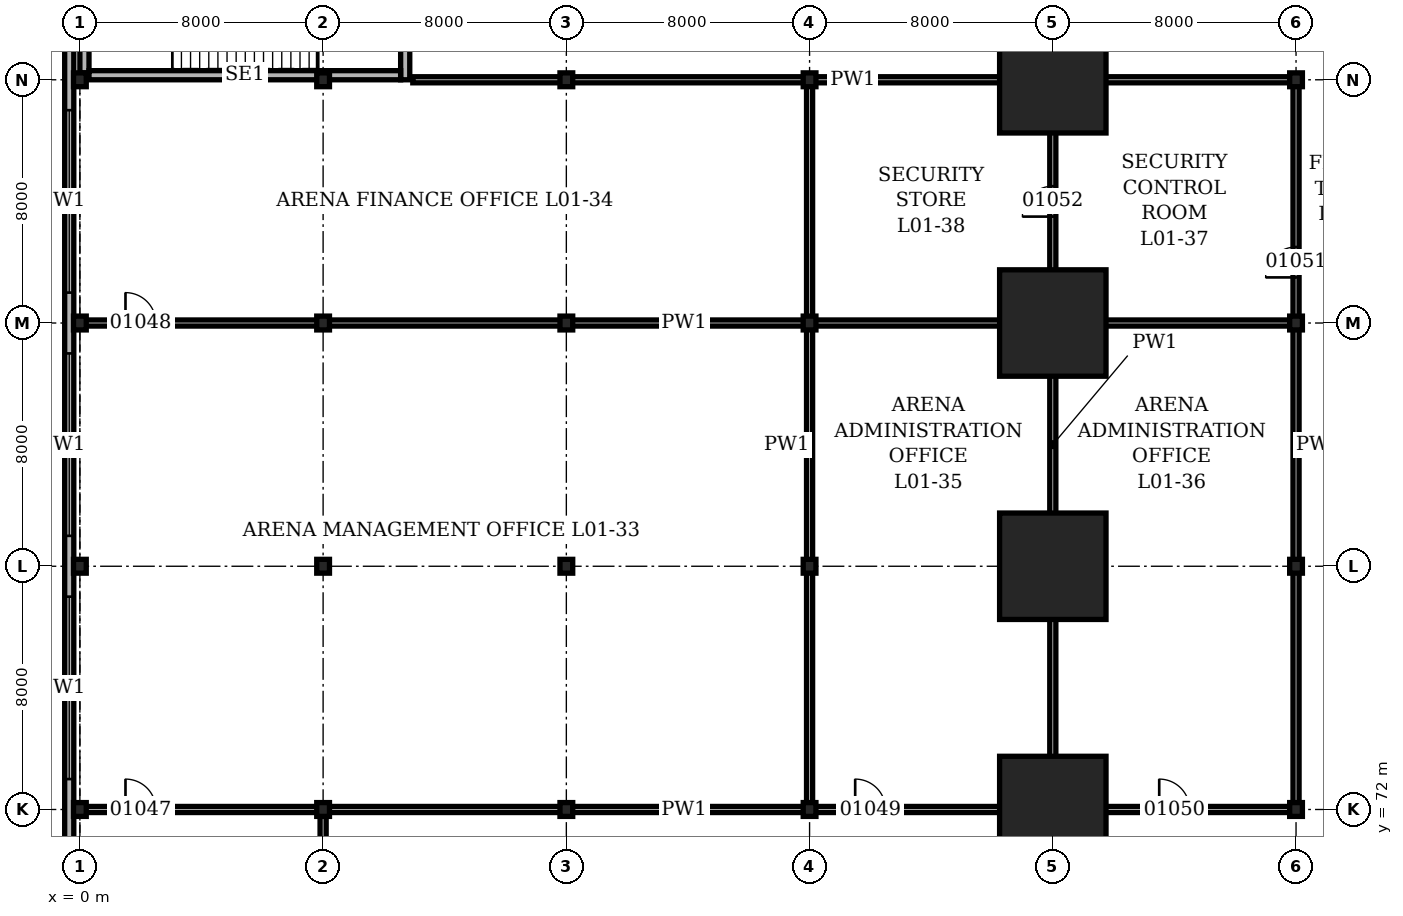
"""IFC4 building model, lengths in metres.
Left out: names, types, materials, properties, quantities, classifications, styles, units other than length and angle.
Written with IfcOpenShell. Run it as: python <this file> out.ifc"""

import sys

from ifc_helpers import new_model, si_unit, direction, frame, frame_2d, origin, origin_2d, place, context, subcontext, project, spatial, rectangle, hollow_rectangle, i_section, extrude, element, fill, save


model = new_model("IFC4")
c1 = context("Model", 3, precision=1e-05, world=origin(), true_north=direction((0.0, 1.0)))
c2 = subcontext(c1, "Body", "Model", "MODEL_VIEW")
j1 = project(units=[si_unit("LENGTHUNIT", "METRE"), si_unit("PLANEANGLEUNIT", "RADIAN")], contexts=[c1])
p1 = place(None, origin())
s1 = spatial("IfcSite", under=j1, at=p1, CompositionType="ELEMENT")
p2 = place(p1, origin())
s2 = spatial("IfcBuilding", under=s1, at=p2, CompositionType="ELEMENT")
p3 = place(p2, frame((0.0, 0.0, 4.9)))
s3 = spatial("IfcBuildingStorey", under=s2, at=p3, CompositionType="ELEMENT", Elevation=4.9)
for number, where, z_axis, x_axis in (
    (1, (0.0, 72.0, 0.0), (0.0, 0.0, 1.0), (1.0, 0.0, 0.0)),
    (2, (0.0, 80.0, 0.0), (0.0, 0.0, 1.0), (1.0, 0.0, 0.0)),
    (3, (0.0, 88.0, 0.0), (0.0, 0.0, 1.0), (1.0, 0.0, 0.0)),
    (4, (0.0, 96.0, 0.0), (0.0, 0.0, 1.0), (1.0, 0.0, 0.0)),
    (5, (8.0, 72.0, 0.0), (0.0, 0.0, 1.0), (1.0, 0.0, 0.0)),
    (6, (8.0, 80.0, 0.0), (0.0, 0.0, 1.0), (1.0, 0.0, 0.0)),
    (7, (8.0, 88.0, 0.0), (0.0, 0.0, 1.0), (1.0, 0.0, 0.0)),
    (8, (8.0, 96.0, 0.0), (0.0, 0.0, 1.0), (1.0, 0.0, 0.0)),
    (9, (16.0, 72.0, 0.0), (0.0, 0.0, 1.0), (1.0, 0.0, 0.0)),
    (10, (16.0, 80.0, 0.0), (0.0, 0.0, 1.0), (1.0, 0.0, 0.0)),
    (11, (16.0, 88.0, 0.0), (0.0, 0.0, 1.0), (1.0, 0.0, 0.0)),
    (12, (16.0, 96.0, 0.0), (0.0, 0.0, 1.0), (1.0, 0.0, 0.0)),
    (13, (24.0, 72.0, 0.0), (0.0, 0.0, 1.0), (1.0, 0.0, 0.0)),
    (14, (24.0, 80.0, 0.0), (0.0, 0.0, 1.0), (1.0, 0.0, 0.0)),
    (15, (24.0, 88.0, 0.0), (0.0, 0.0, 1.0), (1.0, 0.0, 0.0)),
    (16, (24.0, 96.0, 0.0), (0.0, 0.0, 1.0), (1.0, 0.0, 0.0)),
):
    element("IfcColumn", number, at=place(p3, frame(where, z_axis=z_axis, x_axis=x_axis)), inside=s3, PredefinedType="COLUMN", context=c2, shape_type="SweptSolid", body=[
        extrude(i_section(OverallWidth=0.419, OverallDepth=0.455, WebThickness=0.042, FlangeThickness=0.068, at=origin_2d()), origin(), (0.0, 0.0, 1.0), 5.0),
    ])
for number, where, z_axis, x_axis in (
    (17, (32.0, 72.0, 0.0), (0.0, 0.0, 1.0), (1.0, 0.0, 0.0)),
    (18, (32.0, 80.0, 0.0), (0.0, 0.0, 1.0), (1.0, 0.0, 0.0)),
    (19, (32.0, 88.0, 0.0), (0.0, 0.0, 1.0), (1.0, 0.0, 0.0)),
    (20, (32.0, 96.0, 0.0), (0.0, 0.0, 1.0), (1.0, 0.0, 0.0)),
):
    element("IfcColumn", number, at=place(p3, frame(where, z_axis=z_axis, x_axis=x_axis)), inside=s3, PredefinedType="COLUMN", context=c2, shape_type="SweptSolid", body=[
        extrude(hollow_rectangle(XDim=3.5, YDim=3.5, WallThickness=0.5, at=origin_2d()), origin(), (0.0, 0.0, 1.0), 5.0),
    ])
for number, where, z_axis, x_axis in (
    (21, (40.0, 72.0, 0.0), (0.0, 0.0, 1.0), (1.0, 0.0, 0.0)),
    (22, (40.0, 80.0, 0.0), (0.0, 0.0, 1.0), (1.0, 0.0, 0.0)),
    (23, (40.0, 88.0, 0.0), (0.0, 0.0, 1.0), (1.0, 0.0, 0.0)),
    (24, (40.0, 96.0, 0.0), (0.0, 0.0, 1.0), (1.0, 0.0, 0.0)),
):
    element("IfcColumn", number, at=place(p3, frame(where, z_axis=z_axis, x_axis=x_axis)), inside=s3, PredefinedType="COLUMN", context=c2, shape_type="SweptSolid", body=[
        extrude(i_section(OverallWidth=0.419, OverallDepth=0.455, WebThickness=0.042, FlangeThickness=0.068, at=origin_2d()), origin(), (0.0, 0.0, 1.0), 5.0),
    ])
p4 = place(p3, frame((-0.35, 112.35, 0.0), z_axis=(0.0, 0.0, 1.0), x_axis=(0.0, -1.0, 0.0)))
e25 = element("IfcWall", 25, at=p4, inside=s3, PredefinedType="SOLIDWALL", context=c2, shape_type="SweptSolid", body=[
    extrude(rectangle(XDim=112.7, YDim=0.3, at=frame_2d((56.35, 0.0))), origin(), (0.0, 0.0, 1.0), 5.0),
])
p5 = place(p4, frame((1.35, 0.0, 1.0)))
e26 = element("IfcOpeningElement", 26, at=p5, cuts=e25, PredefinedType="OPENING", context=c2, shape_type="SweptSolid", body=[
    extrude(rectangle(XDim=6.0, YDim=1.5, at=frame_2d((3.0, 0.75))), frame((0.0, 0.16, 0.0), z_axis=(0.0, -1.0, 0.0), x_axis=(1.0, 0.0, 0.0)), (0.0, 0.0, 1.0), 0.32),
])
p6 = place(p4, frame((9.35, 0.0, 1.0)))
e27 = element("IfcOpeningElement", 27, at=p6, cuts=e25, PredefinedType="OPENING", context=c2, shape_type="SweptSolid", body=[
    extrude(rectangle(XDim=6.0, YDim=1.5, at=frame_2d((3.0, 0.75))), frame((0.0, 0.16, 0.0), z_axis=(0.0, -1.0, 0.0), x_axis=(1.0, 0.0, 0.0)), (0.0, 0.0, 1.0), 0.32),
])
p7 = place(p4, frame((17.35, 0.0, 1.0)))
e28 = element("IfcOpeningElement", 28, at=p7, cuts=e25, PredefinedType="OPENING", context=c2, shape_type="SweptSolid", body=[
    extrude(rectangle(XDim=6.0, YDim=1.5, at=frame_2d((3.0, 0.75))), frame((0.0, 0.16, 0.0), z_axis=(0.0, -1.0, 0.0), x_axis=(1.0, 0.0, 0.0)), (0.0, 0.0, 1.0), 0.32),
])
p8 = place(p4, frame((25.35, 0.0, 1.0)))
e29 = element("IfcOpeningElement", 29, at=p8, cuts=e25, PredefinedType="OPENING", context=c2, shape_type="SweptSolid", body=[
    extrude(rectangle(XDim=6.0, YDim=1.5, at=frame_2d((3.0, 0.75))), frame((0.0, 0.16, 0.0), z_axis=(0.0, -1.0, 0.0), x_axis=(1.0, 0.0, 0.0)), (0.0, 0.0, 1.0), 0.32),
])
p9 = place(p4, frame((33.35, 0.0, 1.0)))
e30 = element("IfcOpeningElement", 30, at=p9, cuts=e25, PredefinedType="OPENING", context=c2, shape_type="SweptSolid", body=[
    extrude(rectangle(XDim=6.0, YDim=1.5, at=frame_2d((3.0, 0.75))), frame((0.0, 0.16, 0.0), z_axis=(0.0, -1.0, 0.0), x_axis=(1.0, 0.0, 0.0)), (0.0, 0.0, 1.0), 0.32),
])
p10 = place(p4, frame((41.35, 0.0, 1.0)))
e31 = element("IfcOpeningElement", 31, at=p10, cuts=e25, PredefinedType="OPENING", context=c2, shape_type="SweptSolid", body=[
    extrude(rectangle(XDim=6.0, YDim=1.5, at=frame_2d((3.0, 0.75))), frame((0.0, 0.16, 0.0), z_axis=(0.0, -1.0, 0.0), x_axis=(1.0, 0.0, 0.0)), (0.0, 0.0, 1.0), 0.32),
])
p11 = place(p4, frame((49.35, 0.0, 1.0)))
e32 = element("IfcOpeningElement", 32, at=p11, cuts=e25, PredefinedType="OPENING", context=c2, shape_type="SweptSolid", body=[
    extrude(rectangle(XDim=6.0, YDim=1.5, at=frame_2d((3.0, 0.75))), frame((0.0, 0.16, 0.0), z_axis=(0.0, -1.0, 0.0), x_axis=(1.0, 0.0, 0.0)), (0.0, 0.0, 1.0), 0.32),
])
p12 = place(p4, frame((57.35, 0.0, 1.0)))
e33 = element("IfcOpeningElement", 33, at=p12, cuts=e25, PredefinedType="OPENING", context=c2, shape_type="SweptSolid", body=[
    extrude(rectangle(XDim=6.0, YDim=1.5, at=frame_2d((3.0, 0.75))), frame((0.0, 0.16, 0.0), z_axis=(0.0, -1.0, 0.0), x_axis=(1.0, 0.0, 0.0)), (0.0, 0.0, 1.0), 0.32),
])
p13 = place(p4, frame((65.35, 0.0, 1.0)))
e34 = element("IfcOpeningElement", 34, at=p13, cuts=e25, PredefinedType="OPENING", context=c2, shape_type="SweptSolid", body=[
    extrude(rectangle(XDim=6.0, YDim=1.5, at=frame_2d((3.0, 0.75))), frame((0.0, 0.16, 0.0), z_axis=(0.0, -1.0, 0.0), x_axis=(1.0, 0.0, 0.0)), (0.0, 0.0, 1.0), 0.32),
])
p14 = place(p4, frame((73.35, 0.0, 1.0)))
e35 = element("IfcOpeningElement", 35, at=p14, cuts=e25, PredefinedType="OPENING", context=c2, shape_type="SweptSolid", body=[
    extrude(rectangle(XDim=6.0, YDim=1.5, at=frame_2d((3.0, 0.75))), frame((0.0, 0.16, 0.0), z_axis=(0.0, -1.0, 0.0), x_axis=(1.0, 0.0, 0.0)), (0.0, 0.0, 1.0), 0.32),
])
p15 = place(p4, frame((81.35, 0.0, 1.0)))
e36 = element("IfcOpeningElement", 36, at=p15, cuts=e25, PredefinedType="OPENING", context=c2, shape_type="SweptSolid", body=[
    extrude(rectangle(XDim=6.0, YDim=1.5, at=frame_2d((3.0, 0.75))), frame((0.0, 0.16, 0.0), z_axis=(0.0, -1.0, 0.0), x_axis=(1.0, 0.0, 0.0)), (0.0, 0.0, 1.0), 0.32),
])
p16 = place(p4, frame((89.35, 0.0, 1.0)))
e37 = element("IfcOpeningElement", 37, at=p16, cuts=e25, PredefinedType="OPENING", context=c2, shape_type="SweptSolid", body=[
    extrude(rectangle(XDim=6.0, YDim=1.5, at=frame_2d((3.0, 0.75))), frame((0.0, 0.16, 0.0), z_axis=(0.0, -1.0, 0.0), x_axis=(1.0, 0.0, 0.0)), (0.0, 0.0, 1.0), 0.32),
])
p17 = place(p4, frame((97.35, 0.0, 1.0)))
e38 = element("IfcOpeningElement", 38, at=p17, cuts=e25, PredefinedType="OPENING", context=c2, shape_type="SweptSolid", body=[
    extrude(rectangle(XDim=6.0, YDim=1.5, at=frame_2d((3.0, 0.75))), frame((0.0, 0.16, 0.0), z_axis=(0.0, -1.0, 0.0), x_axis=(1.0, 0.0, 0.0)), (0.0, 0.0, 1.0), 0.32),
])
p18 = place(p4, frame((105.35, 0.0, 1.0)))
e39 = element("IfcOpeningElement", 39, at=p18, cuts=e25, PredefinedType="OPENING", context=c2, shape_type="SweptSolid", body=[
    extrude(rectangle(XDim=6.0, YDim=1.5, at=frame_2d((3.0, 0.75))), frame((0.0, 0.16, 0.0), z_axis=(0.0, -1.0, 0.0), x_axis=(1.0, 0.0, 0.0)), (0.0, 0.0, 1.0), 0.32),
])
p19 = place(p3, frame((0.15, 96.227, 0.0), z_axis=(0.0, 0.0, 1.0), x_axis=(0.0, 1.0, 0.0)))
e40 = element("IfcWall", 40, at=p19, inside=s3, PredefinedType="SOLIDWALL", context=c2, shape_type="SweptSolid", body=[
    extrude(rectangle(XDim=7.545, YDim=0.3, at=frame_2d((3.773, 0.0))), origin(), (0.0, 0.0, 1.0), 4.8),
])
p20 = place(p3, frame((10.7, 96.0, 0.0), z_axis=(0.0, 0.0, 1.0), x_axis=(0.0, 1.0, 0.0)))
e41 = element("IfcWall", 41, at=p20, inside=s3, PredefinedType="SOLIDWALL", context=c2, shape_type="SweptSolid", body=[
    extrude(rectangle(XDim=8.0, YDim=0.3, at=frame_2d((4.0, 0.0))), origin(), (0.0, 0.0, 1.0), 4.8),
])
p21 = place(p20, frame((1.1, 0.0, 0.0)))
e42 = element("IfcOpeningElement", 42, at=p21, cuts=e41, PredefinedType="OPENING", context=c2, shape_type="SweptSolid", body=[
    extrude(rectangle(XDim=1.8, YDim=2.1, at=frame_2d((0.9, 1.05))), frame((0.0, 0.16, 0.0), z_axis=(0.0, -1.0, 0.0), x_axis=(1.0, 0.0, 0.0)), (0.0, 0.0, 1.0), 0.32),
])
p22 = place(p3, frame((0.3, 96.15, 0.0), z_axis=(0.0, 0.0, 1.0), x_axis=(1.0, 0.0, 0.0)))
e43 = element("IfcWall", 43, at=p22, inside=s3, PredefinedType="SOLIDWALL", context=c2, shape_type="SweptSolid", body=[
    extrude(rectangle(XDim=10.25, YDim=0.3, at=frame_2d((5.125, 0.0))), origin(), (0.0, 0.0, 1.0), 4.8),
])
p23 = place(p3, frame((-0.15, 72.0, 0.0), z_axis=(0.0, 0.0, 1.0), x_axis=(1.0, 0.0, 0.0)))
e44 = element("IfcWall", 44, at=p23, inside=s3, PredefinedType="PARTITIONING", context=c2, shape_type="SweptSolid", body=[
    extrude(rectangle(XDim=40.05, YDim=0.2, at=frame_2d((20.025, 0.0))), origin(), (0.0, 0.0, 1.0), 4.028),
])
p24 = place(p23, frame((1.65, 0.0, 0.0)))
e45 = element("IfcOpeningElement", 45, at=p24, cuts=e44, PredefinedType="OPENING", context=c2, shape_type="SweptSolid", body=[
    extrude(rectangle(XDim=1.0, YDim=2.1, at=frame_2d((0.5, 1.05))), frame((0.0, 0.11, 0.0), z_axis=(0.0, -1.0, 0.0), x_axis=(1.0, 0.0, 0.0)), (0.0, 0.0, 1.0), 0.22),
])
p25 = place(p23, frame((25.65, 0.0, 0.0)))
e46 = element("IfcOpeningElement", 46, at=p25, cuts=e44, PredefinedType="OPENING", context=c2, shape_type="SweptSolid", body=[
    extrude(rectangle(XDim=1.0, YDim=2.1, at=frame_2d((0.5, 1.05))), frame((0.0, 0.11, 0.0), z_axis=(0.0, -1.0, 0.0), x_axis=(1.0, 0.0, 0.0)), (0.0, 0.0, 1.0), 0.22),
])
p26 = place(p23, frame((35.65, 0.0, 0.0)))
e47 = element("IfcOpeningElement", 47, at=p26, cuts=e44, PredefinedType="OPENING", context=c2, shape_type="SweptSolid", body=[
    extrude(rectangle(XDim=1.0, YDim=2.1, at=frame_2d((0.5, 1.05))), frame((0.0, 0.11, 0.0), z_axis=(0.0, -1.0, 0.0), x_axis=(1.0, 0.0, 0.0)), (0.0, 0.0, 1.0), 0.22),
])
p27 = place(p3, frame((-0.15, 88.0, 0.0), z_axis=(0.0, 0.0, 1.0), x_axis=(1.0, 0.0, 0.0)))
e48 = element("IfcWall", 48, at=p27, inside=s3, PredefinedType="PARTITIONING", context=c2, shape_type="SweptSolid", body=[
    extrude(rectangle(XDim=40.05, YDim=0.2, at=frame_2d((20.025, 0.0))), origin(), (0.0, 0.0, 1.0), 4.028),
])
p28 = place(p27, frame((1.65, 0.0, 0.0)))
e49 = element("IfcOpeningElement", 49, at=p28, cuts=e48, PredefinedType="OPENING", context=c2, shape_type="SweptSolid", body=[
    extrude(rectangle(XDim=1.0, YDim=2.1, at=frame_2d((0.5, 1.05))), frame((0.0, 0.11, 0.0), z_axis=(0.0, -1.0, 0.0), x_axis=(1.0, 0.0, 0.0)), (0.0, 0.0, 1.0), 0.22),
])
p29 = place(p3, frame((10.95, 96.0, 0.0), z_axis=(0.0, 0.0, 1.0), x_axis=(1.0, 0.0, 0.0)))
e50 = element("IfcWall", 50, at=p29, inside=s3, PredefinedType="PARTITIONING", context=c2, shape_type="SweptSolid", body=[
    extrude(rectangle(XDim=28.95, YDim=0.2, at=frame_2d((14.475, 0.0))), origin(), (0.0, 0.0, 1.0), 4.028),
])
p30 = place(p3, frame((8.0, 64.1, 0.0), z_axis=(0.0, 0.0, 1.0), x_axis=(0.0, 1.0, 0.0)))
e51 = element("IfcWall", 51, at=p30, inside=s3, PredefinedType="PARTITIONING", context=c2, shape_type="SweptSolid", body=[
    extrude(rectangle(XDim=7.8, YDim=0.2, at=frame_2d((3.9, 0.0))), origin(), (0.0, 0.0, 1.0), 4.028),
])
p31 = place(p30, frame((1.4, 0.0, 0.0)))
e52 = element("IfcOpeningElement", 52, at=p31, cuts=e51, PredefinedType="OPENING", context=c2, shape_type="SweptSolid", body=[
    extrude(rectangle(XDim=1.0, YDim=2.1, at=frame_2d((0.5, 1.05))), frame((0.0, 0.11, 0.0), z_axis=(0.0, -1.0, 0.0), x_axis=(1.0, 0.0, 0.0)), (0.0, 0.0, 1.0), 0.22),
])
p32 = place(p3, frame((24.0, 72.1, 0.0), z_axis=(0.0, 0.0, 1.0), x_axis=(0.0, 1.0, 0.0)))
e53 = element("IfcWall", 53, at=p32, inside=s3, PredefinedType="PARTITIONING", context=c2, shape_type="SweptSolid", body=[
    extrude(rectangle(XDim=23.8, YDim=0.2, at=frame_2d((11.9, 0.0))), origin(), (0.0, 0.0, 1.0), 4.028),
])
p33 = place(p3, frame((32.0, 72.1, 0.0), z_axis=(0.0, 0.0, 1.0), x_axis=(0.0, 1.0, 0.0)))
e54 = element("IfcWall", 54, at=p33, inside=s3, PredefinedType="PARTITIONING", context=c2, shape_type="SweptSolid", body=[
    extrude(rectangle(XDim=23.8, YDim=0.2, at=frame_2d((11.9, 0.0))), origin(), (0.0, 0.0, 1.0), 4.028),
])
p34 = place(p33, frame((19.4, 0.0, 0.0)))
e55 = element("IfcOpeningElement", 55, at=p34, cuts=e54, PredefinedType="OPENING", context=c2, shape_type="SweptSolid", body=[
    extrude(rectangle(XDim=1.0, YDim=2.1, at=frame_2d((0.5, 1.05))), frame((0.0, 0.11, 0.0), z_axis=(0.0, -1.0, 0.0), x_axis=(1.0, 0.0, 0.0)), (0.0, 0.0, 1.0), 0.22),
])
p35 = place(p3, frame((40.0, 72.1, 0.0), z_axis=(0.0, 0.0, 1.0), x_axis=(0.0, 1.0, 0.0)))
e56 = element("IfcWall", 56, at=p35, inside=s3, PredefinedType="PARTITIONING", context=c2, shape_type="SweptSolid", body=[
    extrude(rectangle(XDim=23.8, YDim=0.2, at=frame_2d((11.9, 0.0))), origin(), (0.0, 0.0, 1.0), 4.028),
])
p36 = place(p35, frame((17.4, 0.0, 0.0)))
e57 = element("IfcOpeningElement", 57, at=p36, cuts=e56, PredefinedType="OPENING", context=c2, shape_type="SweptSolid", body=[
    extrude(rectangle(XDim=1.0, YDim=2.1, at=frame_2d((0.5, 1.05))), frame((0.0, 0.11, 0.0), z_axis=(0.0, -1.0, 0.0), x_axis=(1.0, 0.0, 0.0)), (0.0, 0.0, 1.0), 0.22),
])
p37 = place(p7, origin())
e58 = element("IfcWindow", 58, at=p37, inside=s3, PartitioningType="SINGLE_PANEL", PredefinedType="WINDOW", context=c2, shape_type="SweptSolid", body=[
    extrude(rectangle(XDim=6.0, YDim=1.5, at=frame_2d((3.0, 0.75))), frame((0.0, 0.03, 0.0), z_axis=(0.0, -1.0, 0.0), x_axis=(1.0, 0.0, 0.0)), (0.0, 0.0, 1.0), 0.06),
])
fill(e28, e58)
p38 = place(p8, origin())
e59 = element("IfcWindow", 59, at=p38, inside=s3, PartitioningType="SINGLE_PANEL", PredefinedType="WINDOW", context=c2, shape_type="SweptSolid", body=[
    extrude(rectangle(XDim=6.0, YDim=1.5, at=frame_2d((3.0, 0.75))), frame((0.0, 0.03, 0.0), z_axis=(0.0, -1.0, 0.0), x_axis=(1.0, 0.0, 0.0)), (0.0, 0.0, 1.0), 0.06),
])
fill(e29, e59)
p39 = place(p9, origin())
e60 = element("IfcWindow", 60, at=p39, inside=s3, PartitioningType="SINGLE_PANEL", PredefinedType="WINDOW", context=c2, shape_type="SweptSolid", body=[
    extrude(rectangle(XDim=6.0, YDim=1.5, at=frame_2d((3.0, 0.75))), frame((0.0, 0.03, 0.0), z_axis=(0.0, -1.0, 0.0), x_axis=(1.0, 0.0, 0.0)), (0.0, 0.0, 1.0), 0.06),
])
fill(e30, e60)
p40 = place(p24, origin())
e61 = element("IfcDoor", 61, at=p40, inside=s3, OperationType="SINGLE_SWING_LEFT", PredefinedType="DOOR", context=c2, shape_type="SweptSolid", body=[
    extrude(rectangle(XDim=1.0, YDim=2.1, at=frame_2d((0.5, 1.05))), frame((0.0, 0.1, 0.0), z_axis=(0.0, -1.0, 0.0), x_axis=(1.0, 0.0, 0.0)), (0.0, 0.0, 1.0), 0.199),
])
fill(e45, e61)
p41 = place(p28, origin())
e62 = element("IfcDoor", 62, at=p41, inside=s3, OperationType="SINGLE_SWING_LEFT", PredefinedType="DOOR", context=c2, shape_type="SweptSolid", body=[
    extrude(rectangle(XDim=1.0, YDim=2.1, at=frame_2d((0.5, 1.05))), frame((0.0, 0.1, 0.0), z_axis=(0.0, -1.0, 0.0), x_axis=(1.0, 0.0, 0.0)), (0.0, 0.0, 1.0), 0.199),
])
fill(e49, e62)
p42 = place(p25, origin())
e63 = element("IfcDoor", 63, at=p42, inside=s3, OperationType="SINGLE_SWING_LEFT", PredefinedType="DOOR", context=c2, shape_type="SweptSolid", body=[
    extrude(rectangle(XDim=1.0, YDim=2.1, at=frame_2d((0.5, 1.05))), frame((0.0, 0.1, 0.0), z_axis=(0.0, -1.0, 0.0), x_axis=(1.0, 0.0, 0.0)), (0.0, 0.0, 1.0), 0.199),
])
fill(e46, e63)
p43 = place(p26, origin())
e64 = element("IfcDoor", 64, at=p43, inside=s3, OperationType="SINGLE_SWING_LEFT", PredefinedType="DOOR", context=c2, shape_type="SweptSolid", body=[
    extrude(rectangle(XDim=1.0, YDim=2.1, at=frame_2d((0.5, 1.05))), frame((0.0, 0.1, 0.0), z_axis=(0.0, -1.0, 0.0), x_axis=(1.0, 0.0, 0.0)), (0.0, 0.0, 1.0), 0.199),
])
fill(e47, e64)
p44 = place(p36, origin())
e65 = element("IfcDoor", 65, at=p44, inside=s3, OperationType="SINGLE_SWING_LEFT", PredefinedType="DOOR", context=c2, shape_type="SweptSolid", body=[
    extrude(rectangle(XDim=1.0, YDim=2.1, at=frame_2d((0.5, 1.05))), frame((0.0, 0.1, 0.0), z_axis=(0.0, -1.0, 0.0), x_axis=(1.0, 0.0, 0.0)), (0.0, 0.0, 1.0), 0.199),
])
fill(e57, e65)
p45 = place(p34, origin())
e66 = element("IfcDoor", 66, at=p45, inside=s3, OperationType="SINGLE_SWING_LEFT", PredefinedType="DOOR", context=c2, shape_type="SweptSolid", body=[
    extrude(rectangle(XDim=1.0, YDim=2.1, at=frame_2d((0.5, 1.05))), frame((0.0, 0.1, 0.0), z_axis=(0.0, -1.0, 0.0), x_axis=(1.0, 0.0, 0.0)), (0.0, 0.0, 1.0), 0.199),
])
fill(e55, e66)
save(model, sys.argv[1])
